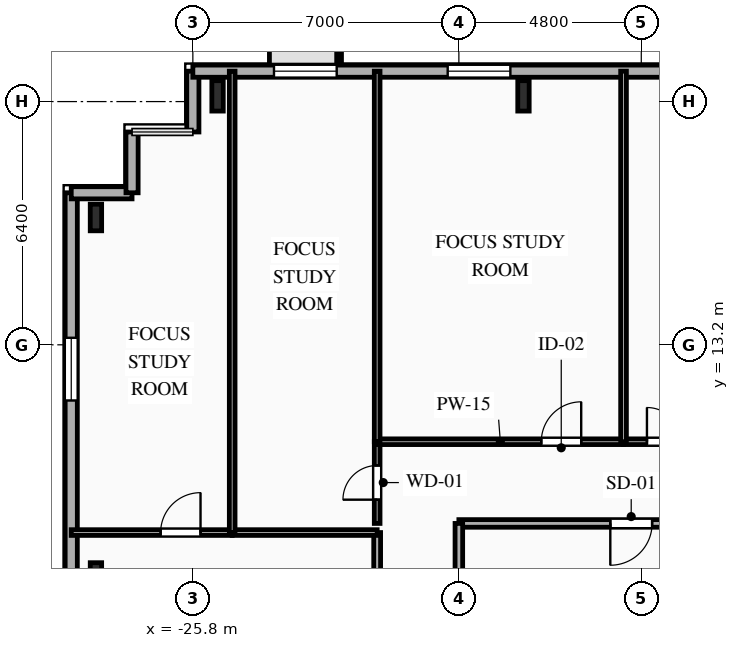
"""IFC4 building model, lengths in metres.
Left out: names, types, materials, properties, quantities, classifications, styles, units other than length and angle.
Written with IfcOpenShell. Run it as: python <this file> out.ifc"""

import sys

from ifc_helpers import new_model, si_unit, direction, frame, frame_2d, origin, origin_2d, place, context, subcontext, project, spatial, rectangle, i_section, extrude, element, fill, save


model = new_model("IFC4")
c1 = context("Model", 3, precision=1e-05, world=origin(), true_north=direction((0.0, 1.0)))
c2 = subcontext(c1, "Body", "Model", "MODEL_VIEW")
j1 = project(units=[si_unit("LENGTHUNIT", "METRE"), si_unit("PLANEANGLEUNIT", "RADIAN")], contexts=[c1])
p1 = place(None, origin())
s1 = spatial("IfcSite", under=j1, at=p1, CompositionType="ELEMENT")
p2 = place(p1, origin())
s2 = spatial("IfcBuilding", under=s1, at=p2, CompositionType="ELEMENT")
p3 = place(p2, frame((0.0, 0.0, 161.15)))
s3 = spatial("IfcBuildingStorey", under=s2, at=p3, CompositionType="ELEMENT", Elevation=161.15)
for number, where, z_axis, x_axis in (
    (1, (-17.1, 19.75, 0.0), (0.0, 0.0, 1.0), (1.0, 0.0, 0.0)),
    (2, (-25.15, 19.75, 0.0), (0.0, 0.0, 1.0), (1.0, 0.0, 0.0)),
):
    element("IfcColumn", number, at=place(p3, frame(where, z_axis=z_axis, x_axis=x_axis)), inside=s3, PredefinedType="COLUMN", context=c2, shape_type="SweptSolid", body=[
        extrude(i_section(OverallWidth=0.3, OverallDepth=0.8, WebThickness=0.018, FlangeThickness=0.033, FilletRadius=0.03, at=origin_2d()), origin(), (0.0, 0.0, 1.0), 3.35),
    ])
for number, where, z_axis, x_axis in (
    (3, (-28.35, 16.55, 0.0), (0.0, 0.0, 1.0), (1.0, 0.0, 0.0)),
    (4, (-28.35, 7.117, 0.0), (0.0, 0.0, 1.0), (1.0, 0.0, 0.0)),
):
    element("IfcColumn", number, at=place(p3, frame(where, z_axis=z_axis, x_axis=x_axis)), inside=s3, PredefinedType="COLUMN", context=c2, shape_type="SweptSolid", body=[
        extrude(i_section(OverallWidth=0.3, OverallDepth=0.7, WebThickness=0.017, FlangeThickness=0.032, FilletRadius=0.027, at=origin_2d()), origin(), (0.0, 0.0, 1.0), 3.35),
    ])
p4 = place(p3, frame((-29.0, -12.4, 0.0), z_axis=(0.0, 0.0, 1.0), x_axis=(0.0, 1.0, 0.0)))
e5 = element("IfcWall", 5, at=p4, inside=s3, PredefinedType="SOLIDWALL", context=c2, shape_type="SweptSolid", body=[
    extrude(rectangle(XDim=29.6, YDim=0.32, at=frame_2d((14.8, 0.0))), origin(), (0.0, 0.0, 1.0), 3.04),
])
p5 = place(p4, frame((3.895, 0.0, 0.85)))
e6 = element("IfcOpeningElement", 6, at=p5, cuts=e5, PredefinedType="OPENING", context=c2, shape_type="SweptSolid", body=[
    extrude(rectangle(XDim=1.65, YDim=1.85, at=frame_2d((0.825, 0.925))), frame((0.0, 0.17, 0.0), z_axis=(0.0, -1.0, 0.0), x_axis=(1.0, 0.0, 0.0)), (0.0, 0.0, 1.0), 0.34),
])
p6 = place(p4, frame((13.74, 0.0, 0.85)))
e7 = element("IfcOpeningElement", 7, at=p6, cuts=e5, PredefinedType="OPENING", context=c2, shape_type="SweptSolid", body=[
    extrude(rectangle(XDim=2.2, YDim=1.85, at=frame_2d((1.1, 0.925))), frame((0.0, 0.17, 0.0), z_axis=(0.0, -1.0, 0.0), x_axis=(1.0, 0.0, 0.0)), (0.0, 0.0, 1.0), 0.34),
])
p7 = place(p4, frame((24.135, 0.0, 0.85)))
e8 = element("IfcOpeningElement", 8, at=p7, cuts=e5, PredefinedType="OPENING", context=c2, shape_type="SweptSolid", body=[
    extrude(rectangle(XDim=1.65, YDim=1.85, at=frame_2d((0.825, 0.925))), frame((0.0, 0.17, 0.0), z_axis=(0.0, -1.0, 0.0), x_axis=(1.0, 0.0, 0.0)), (0.0, 0.0, 1.0), 0.34),
])
for number, where, z_axis, x_axis in (
    (9, (-29.0, 17.2, 0.0), (0.0, 0.0, 1.0), (1.0, 0.0, 0.0)),
    (10, (-27.4, 17.2, 0.0), (0.0, 0.0, 1.0), (0.0, 1.0, 0.0)),
):
    element("IfcWall", number, at=place(p3, frame(where, z_axis=z_axis, x_axis=x_axis)), inside=s3, PredefinedType="SOLIDWALL", context=c2, shape_type="SweptSolid", body=[
        extrude(rectangle(XDim=1.6, YDim=0.32, at=frame_2d((0.8, 0.0))), origin(), (0.0, 0.0, 1.0), 3.04),
    ])
p8 = place(p3, frame((-25.8, 18.8, 0.0), z_axis=(0.0, 0.0, 1.0), x_axis=(0.0, 1.0, 0.0)))
e11 = element("IfcWall", 11, at=p8, inside=s3, PredefinedType="SOLIDWALL", context=c2, shape_type="SweptSolid", body=[
    extrude(rectangle(XDim=1.6, YDim=0.32, at=frame_2d((0.8, 0.0))), origin(), (0.0, 0.0, 1.0), 3.04),
])
p9 = place(p3, frame((-25.8, 20.4, 0.0), z_axis=(0.0, 0.0, 1.0), x_axis=(1.0, 0.0, 0.0)))
e12 = element("IfcWall", 12, at=p9, inside=s3, PredefinedType="SOLIDWALL", context=c2, shape_type="SweptSolid", body=[
    extrude(rectangle(XDim=49.6, YDim=0.32, at=frame_2d((24.8, 0.0))), origin(), (0.0, 0.0, 1.0), 3.04),
])
p10 = place(p9, frame((2.135, 0.0, 0.85)))
e13 = element("IfcOpeningElement", 13, at=p10, cuts=e12, PredefinedType="OPENING", context=c2, shape_type="SweptSolid", body=[
    extrude(rectangle(XDim=1.65, YDim=1.85, at=frame_2d((0.825, 0.925))), frame((0.0, 0.17, 0.0), z_axis=(0.0, -1.0, 0.0), x_axis=(1.0, 0.0, 0.0)), (0.0, 0.0, 1.0), 0.34),
])
p11 = place(p9, frame((6.706, 0.0, 0.85)))
e14 = element("IfcOpeningElement", 14, at=p11, cuts=e12, PredefinedType="OPENING", context=c2, shape_type="SweptSolid", body=[
    extrude(rectangle(XDim=1.65, YDim=1.85, at=frame_2d((0.825, 0.925))), frame((0.0, 0.17, 0.0), z_axis=(0.0, -1.0, 0.0), x_axis=(1.0, 0.0, 0.0)), (0.0, 0.0, 1.0), 0.34),
])
p12 = place(p9, frame((14.931, 0.0, 0.85)))
e15 = element("IfcOpeningElement", 15, at=p12, cuts=e12, PredefinedType="OPENING", context=c2, shape_type="SweptSolid", body=[
    extrude(rectangle(XDim=1.6, YDim=1.85, at=frame_2d((0.8, 0.925))), frame((0.0, 0.17, 0.0), z_axis=(0.0, -1.0, 0.0), x_axis=(1.0, 0.0, 0.0)), (0.0, 0.0, 1.0), 0.34),
])
p13 = place(p9, frame((20.74, 0.0, 0.85)))
e16 = element("IfcOpeningElement", 16, at=p13, cuts=e12, PredefinedType="OPENING", context=c2, shape_type="SweptSolid", body=[
    extrude(rectangle(XDim=2.2, YDim=1.85, at=frame_2d((1.1, 0.925))), frame((0.0, 0.17, 0.0), z_axis=(0.0, -1.0, 0.0), x_axis=(1.0, 0.0, 0.0)), (0.0, 0.0, 1.0), 0.34),
])
p14 = place(p9, frame((27.74, 0.0, 0.85)))
e17 = element("IfcOpeningElement", 17, at=p14, cuts=e12, PredefinedType="OPENING", context=c2, shape_type="SweptSolid", body=[
    extrude(rectangle(XDim=2.2, YDim=1.85, at=frame_2d((1.1, 0.925))), frame((0.0, 0.17, 0.0), z_axis=(0.0, -1.0, 0.0), x_axis=(1.0, 0.0, 0.0)), (0.0, 0.0, 1.0), 0.34),
])
p15 = place(p9, frame((34.7, 0.0, 0.85)))
e18 = element("IfcOpeningElement", 18, at=p15, cuts=e12, PredefinedType="OPENING", context=c2, shape_type="SweptSolid", body=[
    extrude(rectangle(XDim=2.2, YDim=1.85, at=frame_2d((1.1, 0.925))), frame((0.0, 0.17, 0.0), z_axis=(0.0, -1.0, 0.0), x_axis=(1.0, 0.0, 0.0)), (0.0, 0.0, 1.0), 0.34),
])
p16 = place(p9, frame((42.215, 0.0, 0.85)))
e19 = element("IfcOpeningElement", 19, at=p16, cuts=e12, PredefinedType="OPENING", context=c2, shape_type="SweptSolid", body=[
    extrude(rectangle(XDim=1.65, YDim=1.85, at=frame_2d((0.825, 0.925))), frame((0.0, 0.17, 0.0), z_axis=(0.0, -1.0, 0.0), x_axis=(1.0, 0.0, 0.0)), (0.0, 0.0, 1.0), 0.34),
])
p17 = place(p9, frame((47.45, 0.0, 0.85)))
e20 = element("IfcOpeningElement", 20, at=p17, cuts=e12, PredefinedType="OPENING", context=c2, shape_type="SweptSolid", body=[
    extrude(rectangle(XDim=1.1, YDim=1.85, at=frame_2d((0.55, 0.925))), frame((0.0, 0.17, 0.0), z_axis=(0.0, -1.0, 0.0), x_axis=(1.0, 0.0, 0.0)), (0.0, 0.0, 1.0), 0.34),
])
p18 = place(p3, frame((-12.0, 8.5, 0.0), z_axis=(0.0, 0.0, 1.0), x_axis=(-1.0, 0.0, 0.0)))
e21 = element("IfcWall", 21, at=p18, inside=s3, PredefinedType="PARTITIONING", context=c2, shape_type="SweptSolid", body=[
    extrude(rectangle(XDim=6.8, YDim=0.2, at=frame_2d((3.4, 0.0))), origin(), (0.0, 0.0, 1.0), 3.04),
])
p19 = place(p18, frame((1.715, 0.0, 0.0)))
e22 = element("IfcOpeningElement", 22, at=p19, cuts=e21, PredefinedType="OPENING", context=c2, shape_type="SweptSolid", body=[
    extrude(rectangle(XDim=1.1, YDim=2.15, at=frame_2d((0.55, 1.075))), frame((0.0, 0.11, 0.0), z_axis=(0.0, -1.0, 0.0), x_axis=(1.0, 0.0, 0.0)), (0.0, 0.0, 1.0), 0.22),
])
p20 = place(p3, frame((-18.8, 8.5, 0.0), z_axis=(0.0, 0.0, 1.0), x_axis=(0.0, -1.0, 0.0)))
e23 = element("IfcWall", 23, at=p20, inside=s3, PredefinedType="PARTITIONING", context=c2, shape_type="SweptSolid", body=[
    extrude(rectangle(XDim=2.9, YDim=0.2, at=frame_2d((1.45, 0.0))), origin(), (0.0, 0.0, 1.0), 2.525),
])
p21 = place(p3, frame((-20.95, 8.5, 0.0), z_axis=(0.0, 0.0, 1.0), x_axis=(0.0, 1.0, 0.0)))
e24 = element("IfcWall", 24, at=p21, inside=s3, PredefinedType="PARTITIONING", context=c2, shape_type="SweptSolid", body=[
    extrude(rectangle(XDim=2.15, YDim=0.15, at=frame_2d((1.075, 0.0))), origin(), (0.0, 0.0, 1.0), 3.04),
])
p22 = place(p21, frame((0.625, 0.0, 0.0)))
e25 = element("IfcOpeningElement", 25, at=p22, cuts=e24, PredefinedType="OPENING", context=c2, shape_type="SweptSolid", body=[
    extrude(rectangle(XDim=0.9, YDim=2.1, at=frame_2d((0.45, 1.05))), frame((0.0, 0.085, 0.0), z_axis=(0.0, -1.0, 0.0), x_axis=(1.0, 0.0, 0.0)), (0.0, 0.0, 1.0), 0.17),
])
p23 = place(p3, frame((-20.95, 10.65, 0.0), z_axis=(0.0, 0.0, 1.0), x_axis=(1.0, 0.0, 0.0)))
e26 = element("IfcWall", 26, at=p23, inside=s3, PredefinedType="PARTITIONING", context=c2, shape_type="SweptSolid", body=[
    extrude(rectangle(XDim=6.483, YDim=0.15, at=frame_2d((3.241, 0.0))), origin(), (0.0, 0.0, 1.0), 3.04),
])
p24 = place(p23, frame((4.319, 0.0, 0.0)))
e27 = element("IfcOpeningElement", 27, at=p24, cuts=e26, PredefinedType="OPENING", context=c2, shape_type="SweptSolid", body=[
    extrude(rectangle(XDim=1.05, YDim=2.15, at=frame_2d((0.525, 1.075))), frame((0.0, 0.085, 0.0), z_axis=(0.0, -1.0, 0.0), x_axis=(1.0, 0.0, 0.0)), (0.0, 0.0, 1.0), 0.17),
])
p25 = place(p3, frame((-14.467, 10.65, 0.0), z_axis=(0.0, 0.0, 1.0), x_axis=(1.0, 0.0, 0.0)))
e28 = element("IfcWall", 28, at=p25, inside=s3, PredefinedType="PLUMBINGWALL", context=c2, shape_type="SweptSolid", body=[
    extrude(rectangle(XDim=2.35, YDim=0.15, at=frame_2d((1.175, 0.0))), origin(), (0.0, 0.0, 1.0), 3.04),
])
p26 = place(p25, frame((0.616, 0.0, 0.0)))
e29 = element("IfcOpeningElement", 29, at=p26, cuts=e28, PredefinedType="OPENING", context=c2, shape_type="SweptSolid", body=[
    extrude(rectangle(XDim=0.9, YDim=2.1, at=frame_2d((0.45, 1.05))), frame((0.0, 0.085, 0.0), z_axis=(0.0, -1.0, 0.0), x_axis=(1.0, 0.0, 0.0)), (0.0, 0.0, 1.0), 0.17),
])
p27 = place(p3, frame((-20.95, -1.31, 0.0), z_axis=(0.0, 0.0, 1.0), x_axis=(0.0, 1.0, 0.0)))
e30 = element("IfcWall", 30, at=p27, inside=s3, PredefinedType="PARTITIONING", context=c2, shape_type="SweptSolid", body=[
    extrude(rectangle(XDim=9.57, YDim=0.18, at=frame_2d((4.785, 0.0))), origin(), (0.0, 0.0, 1.0), 3.04),
])
p28 = place(p27, frame((1.506, 0.0, 0.0)))
e31 = element("IfcOpeningElement", 31, at=p28, cuts=e30, PredefinedType="OPENING", context=c2, shape_type="SweptSolid", body=[
    extrude(rectangle(XDim=1.0, YDim=2.15, at=frame_2d((0.5, 1.075))), frame((0.0, 0.1, 0.0), z_axis=(0.0, -1.0, 0.0), x_axis=(1.0, 0.0, 0.0)), (0.0, 0.0, 1.0), 0.2),
])
p29 = place(p3, frame((-29.0, 8.26, 0.0), z_axis=(0.0, 0.0, 1.0), x_axis=(1.0, 0.0, 0.0)))
e32 = element("IfcWall", 32, at=p29, inside=s3, PredefinedType="PARTITIONING", context=c2, shape_type="SweptSolid", body=[
    extrude(rectangle(XDim=4.235, YDim=0.15, at=frame_2d((2.118, 0.0))), origin(), (0.0, 0.0, 1.0), 3.04),
])
p30 = place(p29, frame((2.352, 0.0, 0.0)))
e33 = element("IfcOpeningElement", 33, at=p30, cuts=e32, PredefinedType="OPENING", context=c2, shape_type="SweptSolid", body=[
    extrude(rectangle(XDim=1.05, YDim=2.15, at=frame_2d((0.525, 1.075))), frame((0.0, 0.085, 0.0), z_axis=(0.0, -1.0, 0.0), x_axis=(1.0, 0.0, 0.0)), (0.0, 0.0, 1.0), 0.17),
])
p31 = place(p3, frame((-24.765, 8.26, 0.0), z_axis=(0.0, 0.0, 1.0), x_axis=(1.0, 0.0, 0.0)))
e34 = element("IfcWall", 34, at=p31, inside=s3, PredefinedType="PARTITIONING", context=c2, shape_type="SweptSolid", body=[
    extrude(rectangle(XDim=3.815, YDim=0.15, at=frame_2d((1.907, 0.0))), origin(), (0.0, 0.0, 1.0), 3.04),
])
p32 = place(p3, frame((-24.765, 20.4, 0.0), z_axis=(0.0, 0.0, 1.0), x_axis=(0.0, -1.0, 0.0)))
e35 = element("IfcWall", 35, at=p32, inside=s3, PredefinedType="PARTITIONING", context=c2, shape_type="SweptSolid", body=[
    extrude(rectangle(XDim=12.14, YDim=0.15, at=frame_2d((6.07, 0.0))), origin(), (0.0, 0.0, 1.0), 3.04),
])
p33 = place(p3, frame((-20.95, 20.4, 0.0), z_axis=(0.0, 0.0, 1.0), x_axis=(0.0, -1.0, 0.0)))
e36 = element("IfcWall", 36, at=p33, inside=s3, PredefinedType="PARTITIONING", context=c2, shape_type="SweptSolid", body=[
    extrude(rectangle(XDim=9.75, YDim=0.15, at=frame_2d((4.875, 0.0))), origin(), (0.0, 0.0, 1.0), 3.04),
])
p34 = place(p3, frame((-14.467, 20.4, 0.0), z_axis=(0.0, 0.0, 1.0), x_axis=(0.0, -1.0, 0.0)))
e37 = element("IfcWall", 37, at=p34, inside=s3, PredefinedType="PLUMBINGWALL", context=c2, shape_type="SweptSolid", body=[
    extrude(rectangle(XDim=9.75, YDim=0.15, at=frame_2d((4.875, 0.0))), origin(), (0.0, 0.0, 1.0), 3.04),
])
p35 = place(p7, origin())
e38 = element("IfcWindow", 38, at=p35, inside=s3, PartitioningType="SINGLE_PANEL", PredefinedType="WINDOW", context=c2, shape_type="SweptSolid", body=[
    extrude(rectangle(XDim=1.65, YDim=1.85, at=frame_2d((0.825, 0.925))), frame((0.0, 0.03, 0.0), z_axis=(0.0, -1.0, 0.0), x_axis=(1.0, 0.0, 0.0)), (0.0, 0.0, 1.0), 0.06),
])
fill(e8, e38)
p36 = place(p10, origin())
e39 = element("IfcWindow", 39, at=p36, inside=s3, PartitioningType="SINGLE_PANEL", PredefinedType="WINDOW", context=c2, shape_type="SweptSolid", body=[
    extrude(rectangle(XDim=1.65, YDim=1.85, at=frame_2d((0.825, 0.925))), frame((0.0, 0.03, 0.0), z_axis=(0.0, -1.0, 0.0), x_axis=(1.0, 0.0, 0.0)), (0.0, 0.0, 1.0), 0.06),
])
fill(e13, e39)
p37 = place(p11, origin())
e40 = element("IfcWindow", 40, at=p37, inside=s3, PartitioningType="SINGLE_PANEL", PredefinedType="WINDOW", context=c2, shape_type="SweptSolid", body=[
    extrude(rectangle(XDim=1.65, YDim=1.85, at=frame_2d((0.825, 0.925))), frame((0.0, 0.03, 0.0), z_axis=(0.0, -1.0, 0.0), x_axis=(1.0, 0.0, 0.0)), (0.0, 0.0, 1.0), 0.06),
])
fill(e14, e40)
p38 = place(p19, origin())
e41 = element("IfcDoor", 41, at=p38, inside=s3, OperationType="SINGLE_SWING_RIGHT", PredefinedType="DOOR", context=c2, shape_type="SweptSolid", body=[
    extrude(rectangle(XDim=1.1, YDim=2.15, at=frame_2d((0.55, 1.075))), frame((0.0, 0.025, 0.0), z_axis=(0.0, -1.0, 0.0), x_axis=(1.0, 0.0, 0.0)), (0.0, 0.0, 1.0), 0.05),
])
fill(e22, e41)
p39 = place(p22, origin())
e42 = element("IfcDoor", 42, at=p39, inside=s3, OperationType="SINGLE_SWING_LEFT", PredefinedType="DOOR", context=c2, shape_type="SweptSolid", body=[
    extrude(rectangle(XDim=0.9, YDim=2.1, at=frame_2d((0.45, 1.05))), frame((0.0, 0.025, 0.0), z_axis=(0.0, -1.0, 0.0), x_axis=(1.0, 0.0, 0.0)), (0.0, 0.0, 1.0), 0.05),
])
fill(e25, e42)
p40 = place(p24, origin())
e43 = element("IfcDoor", 43, at=p40, inside=s3, OperationType="SINGLE_SWING_RIGHT", PredefinedType="DOOR", context=c2, shape_type="SweptSolid", body=[
    extrude(rectangle(XDim=1.05, YDim=2.15, at=frame_2d((0.525, 1.075))), frame((0.0, 0.025, 0.0), z_axis=(0.0, -1.0, 0.0), x_axis=(1.0, 0.0, 0.0)), (0.0, 0.0, 1.0), 0.05),
])
fill(e27, e43)
p41 = place(p26, origin())
e44 = element("IfcDoor", 44, at=p41, inside=s3, OperationType="SINGLE_SWING_LEFT", PredefinedType="DOOR", context=c2, shape_type="SweptSolid", body=[
    extrude(rectangle(XDim=0.9, YDim=2.1, at=frame_2d((0.45, 1.05))), frame((0.0, 0.025, 0.0), z_axis=(0.0, -1.0, 0.0), x_axis=(1.0, 0.0, 0.0)), (0.0, 0.0, 1.0), 0.05),
])
fill(e29, e44)
p42 = place(p30, origin())
e45 = element("IfcDoor", 45, at=p42, inside=s3, OperationType="SINGLE_SWING_RIGHT", PredefinedType="DOOR", context=c2, shape_type="SweptSolid", body=[
    extrude(rectangle(XDim=1.05, YDim=2.15, at=frame_2d((0.525, 1.075))), frame((0.0, 0.025, 0.0), z_axis=(0.0, -1.0, 0.0), x_axis=(1.0, 0.0, 0.0)), (0.0, 0.0, 1.0), 0.05),
])
fill(e33, e45)
save(model, sys.argv[1])
